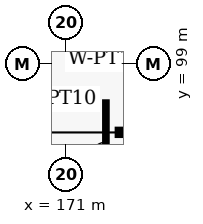
"""IFC4 building model, lengths in metres.
Left out: names, types, materials, properties, quantities, classifications, styles, units other than length and angle.
Written with IfcOpenShell. Run it as: python <this file> out.ifc"""

import sys

from ifc_helpers import new_model, si_unit, direction, frame, frame_2d, origin, origin_2d, place, context, subcontext, project, spatial, rectangle, i_section, extrude, element, fill, save


model = new_model("IFC4")
c1 = context("Model", 3, precision=1e-05, world=origin(), true_north=direction((0.0, 1.0)))
c2 = subcontext(c1, "Body", "Model", "MODEL_VIEW")
j1 = project(units=[si_unit("LENGTHUNIT", "METRE"), si_unit("PLANEANGLEUNIT", "RADIAN")], contexts=[c1])
p1 = place(None, origin())
s1 = spatial("IfcSite", under=j1, at=p1, CompositionType="ELEMENT")
p2 = place(p1, origin())
s2 = spatial("IfcBuilding", under=s1, at=p2, CompositionType="ELEMENT")
p3 = place(p2, origin())
s3 = spatial("IfcBuildingStorey", under=s2, at=p3, CompositionType="ELEMENT", Elevation=0.0)
p4 = place(p3, frame((174.5, 94.5, 0.0), z_axis=(0.0, 0.0, 1.0), x_axis=(-1.0, 0.0, 0.0)))
e1 = element("IfcColumn", 1, at=p4, inside=s3, PredefinedType="COLUMN", context=c2, shape_type="SweptSolid", body=[
    extrude(i_section(OverallWidth=0.3, OverallDepth=0.4, WebThickness=0.013, FlangeThickness=0.024, FilletRadius=0.027, at=origin_2d()), origin(), (0.0, 0.0, 1.0), 5.4),
])
p5 = place(p3, frame((173.6, 90.2, 0.0), z_axis=(0.0, 0.0, 1.0), x_axis=(0.0, 1.0, 0.0)))
e2 = element("IfcWall", 2, at=p5, inside=s3, PredefinedType="PARTITIONING", context=c2, shape_type="SweptSolid", body=[
    extrude(rectangle(XDim=6.3, YDim=0.155, at=frame_2d((3.15, 0.0))), origin(), (0.0, 0.0, 1.0), 4.3),
])
p6 = place(p5, frame((2.65, 0.0, 0.0)))
e3 = element("IfcOpeningElement", 3, at=p6, cuts=e2, PredefinedType="OPENING", context=c2, shape_type="SweptSolid", body=[
    extrude(rectangle(XDim=1.0, YDim=2.1, at=frame_2d((0.5, 1.05))), frame((0.0, 0.087, 0.0), z_axis=(0.0, -1.0, 0.0), x_axis=(1.0, 0.0, 0.0)), (0.0, 0.0, 1.0), 0.175),
])
p7 = place(p6, origin())
e4 = element("IfcDoor", 4, at=p7, inside=s3, OperationType="SINGLE_SWING_LEFT", PredefinedType="DOOR", context=c2, shape_type="SweptSolid", body=[
    extrude(rectangle(XDim=1.0, YDim=2.1, at=frame_2d((0.5, 1.05))), frame((0.0, 0.025, 0.0), z_axis=(0.0, -1.0, 0.0), x_axis=(1.0, 0.0, 0.0)), (0.0, 0.0, 1.0), 0.05),
])
fill(e3, e4)
save(model, sys.argv[1])
